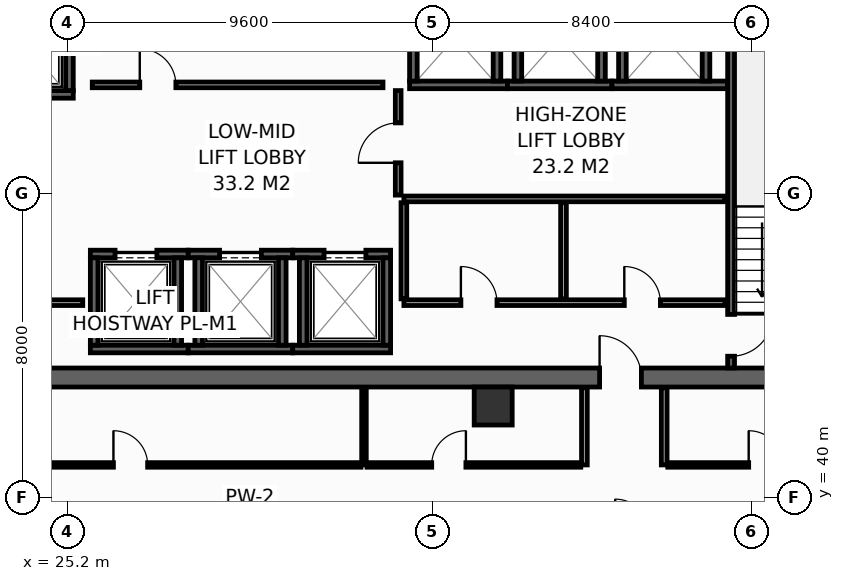
"""IFC4 building model, lengths in metres.
Left out: names, types, materials, properties, quantities, classifications, styles, units other than length and angle.
Written with IfcOpenShell. Run it as: python <this file> out.ifc"""

import sys

from ifc_helpers import new_model, si_unit, direction, frame, frame_2d, origin, origin_2d, place, context, subcontext, project, spatial, rectangle, hollow_rectangle, extrude, element, fill, save


model = new_model("IFC4")
c1 = context("Model", 3, precision=1e-05, world=origin(), true_north=direction((0.0, 1.0)))
c2 = subcontext(c1, "Body", "Model", "MODEL_VIEW")
j1 = project(units=[si_unit("LENGTHUNIT", "METRE"), si_unit("PLANEANGLEUNIT", "RADIAN")], contexts=[c1])
p1 = place(None, origin())
s1 = spatial("IfcSite", under=j1, at=p1, CompositionType="ELEMENT")
p2 = place(p1, origin())
s2 = spatial("IfcBuilding", under=s1, at=p2, CompositionType="ELEMENT")
p3 = place(p2, frame((0.0, 0.0, 160.0)))
s3 = spatial("IfcBuildingStorey", under=s2, at=p3, CompositionType="ELEMENT", Elevation=160.0)
p4 = place(p3, frame((13.6, 43.15, 0.0), z_axis=(0.0, 0.0, 1.0), x_axis=(1.0, 0.0, 0.0)))
e1 = element("IfcWall", 1, at=p4, inside=s3, PredefinedType="SHEAR", context=c2, shape_type="SweptSolid", body=[
    extrude(rectangle(XDim=32.7, YDim=0.5, at=frame_2d((16.35, 0.0))), origin(), (0.0, 0.0, 1.0), 3.55),
])
p5 = place(p4, frame((5.4, 0.0, 0.0)))
e2 = element("IfcOpeningElement", 2, at=p5, cuts=e1, PredefinedType="OPENING", context=c2, shape_type="SweptSolid", body=[
    extrude(rectangle(XDim=1.1, YDim=2.15, at=frame_2d((0.55, 1.075))), frame((0.0, 0.26, 0.0), z_axis=(0.0, -1.0, 0.0), x_axis=(1.0, 0.0, 0.0)), (0.0, 0.0, 1.0), 0.52),
])
p6 = place(p4, frame((25.6, 0.0, 0.0)))
e3 = element("IfcOpeningElement", 3, at=p6, cuts=e1, PredefinedType="OPENING", context=c2, shape_type="SweptSolid", body=[
    extrude(rectangle(XDim=1.1, YDim=2.15, at=frame_2d((0.55, 1.075))), frame((0.0, 0.26, 0.0), z_axis=(0.0, -1.0, 0.0), x_axis=(1.0, 0.0, 0.0)), (0.0, 0.0, 1.0), 0.52),
])
p7 = place(p3, frame((36.4, 42.4, 0.0), z_axis=(0.0, 0.0, 1.0), x_axis=(1.0, 0.0, 0.0)))
e4 = element("IfcColumn", 4, at=p7, inside=s3, PredefinedType="COLUMN", context=c2, shape_type="SweptSolid", body=[
    extrude(hollow_rectangle(XDim=1.0, YDim=1.0, WallThickness=0.045, at=origin_2d()), origin(), (0.0, 0.0, 1.0), 3.8),
])
p8 = place(p3, frame((22.5, 50.6, 0.0), z_axis=(0.0, 0.0, 1.0), x_axis=(1.0, 0.0, 0.0)))
e5 = element("IfcWall", 5, at=p8, inside=s3, PredefinedType="SHEAR", context=c2, shape_type="SweptSolid", body=[
    extrude(rectangle(XDim=2.85, YDim=0.2, at=frame_2d((1.425, 0.0))), origin(), (0.0, 0.0, 1.0), 3.55),
])
p9 = place(p8, frame((0.925, 0.0, 0.0)))
e6 = element("IfcOpeningElement", 6, at=p9, cuts=e5, PredefinedType="OPENING", context=c2, shape_type="SweptSolid", body=[
    extrude(rectangle(XDim=1.25, YDim=2.3, at=frame_2d((0.625, 1.15))), frame((0.0, 0.11, 0.0), z_axis=(0.0, -1.0, 0.0), x_axis=(1.0, 0.0, 0.0)), (0.0, 0.0, 1.0), 0.22),
])
p10 = place(p3, frame((25.25, 50.7, 0.0), z_axis=(0.0, 0.0, 1.0), x_axis=(0.0, 1.0, 0.0)))
e7 = element("IfcWall", 7, at=p10, inside=s3, PredefinedType="SHEAR", context=c2, shape_type="SweptSolid", body=[
    extrude(rectangle(XDim=2.6, YDim=0.2, at=frame_2d((1.3, 0.0))), origin(), (0.0, 0.0, 1.0), 3.55),
])
p11 = place(p3, frame((25.8, 43.9, 0.0), z_axis=(0.0, 0.0, 1.0), x_axis=(1.0, 0.0, 0.0)))
e8 = element("IfcWall", 8, at=p11, inside=s3, PredefinedType="SHEAR", context=c2, shape_type="SweptSolid", body=[
    extrude(rectangle(XDim=2.575, YDim=0.2, at=frame_2d((1.288, 0.0))), origin(), (0.0, 0.0, 1.0), 3.55),
])
p12 = place(p3, frame((25.8, 46.4, 0.0), z_axis=(0.0, 0.0, 1.0), x_axis=(1.0, 0.0, 0.0)))
e9 = element("IfcWall", 9, at=p12, inside=s3, PredefinedType="SHEAR", context=c2, shape_type="SweptSolid", body=[
    extrude(rectangle(XDim=2.575, YDim=0.2, at=frame_2d((1.288, 0.0))), origin(), (0.0, 0.0, 1.0), 3.55),
])
p13 = place(p12, frame((0.65, 0.0, 0.0)))
e10 = element("IfcOpeningElement", 10, at=p13, cuts=e9, PredefinedType="OPENING", context=c2, shape_type="SweptSolid", body=[
    extrude(rectangle(XDim=1.1, YDim=2.2, at=frame_2d((0.55, 1.1))), frame((0.0, 0.11, 0.0), z_axis=(0.0, -1.0, 0.0), x_axis=(1.0, 0.0, 0.0)), (0.0, 0.0, 1.0), 0.22),
])
for number, where, z_axis, x_axis in (
    (11, (25.9, 44.0, 0.0), (0.0, 0.0, 1.0), (0.0, 1.0, 0.0)),
    (12, (28.1, 44.0, 0.0), (0.0, 0.0, 1.0), (0.0, 1.0, 0.0)),
):
    element("IfcWall", number, at=place(p3, frame(where, z_axis=z_axis, x_axis=x_axis)), inside=s3, PredefinedType="SHEAR", context=c2, shape_type="SweptSolid", body=[
        extrude(rectangle(XDim=2.3, YDim=0.2, at=frame_2d((1.15, 0.0))), origin(), (0.0, 0.0, 1.0), 3.55),
    ])
p14 = place(p3, frame((28.375, 43.9, 0.0), z_axis=(0.0, 0.0, 1.0), x_axis=(1.0, 0.0, 0.0)))
e13 = element("IfcWall", 13, at=p14, inside=s3, PredefinedType="SHEAR", context=c2, shape_type="SweptSolid", body=[
    extrude(rectangle(XDim=2.75, YDim=0.2, at=frame_2d((1.375, 0.0))), origin(), (0.0, 0.0, 1.0), 3.55),
])
p15 = place(p3, frame((28.375, 46.4, 0.0), z_axis=(0.0, 0.0, 1.0), x_axis=(1.0, 0.0, 0.0)))
e14 = element("IfcWall", 14, at=p15, inside=s3, PredefinedType="SHEAR", context=c2, shape_type="SweptSolid", body=[
    extrude(rectangle(XDim=2.75, YDim=0.2, at=frame_2d((1.375, 0.0))), origin(), (0.0, 0.0, 1.0), 3.55),
])
p16 = place(p15, frame((0.825, 0.0, 0.0)))
e15 = element("IfcOpeningElement", 15, at=p16, cuts=e14, PredefinedType="OPENING", context=c2, shape_type="SweptSolid", body=[
    extrude(rectangle(XDim=1.1, YDim=2.2, at=frame_2d((0.55, 1.1))), frame((0.0, 0.11, 0.0), z_axis=(0.0, -1.0, 0.0), x_axis=(1.0, 0.0, 0.0)), (0.0, 0.0, 1.0), 0.22),
])
for number, where, z_axis, x_axis in (
    (16, (28.65, 44.0, 0.0), (0.0, 0.0, 1.0), (0.0, 1.0, 0.0)),
    (17, (30.85, 44.0, 0.0), (0.0, 0.0, 1.0), (0.0, 1.0, 0.0)),
):
    element("IfcWall", number, at=place(p3, frame(where, z_axis=z_axis, x_axis=x_axis)), inside=s3, PredefinedType="SHEAR", context=c2, shape_type="SweptSolid", body=[
        extrude(rectangle(XDim=2.3, YDim=0.2, at=frame_2d((1.15, 0.0))), origin(), (0.0, 0.0, 1.0), 3.55),
    ])
p17 = place(p3, frame((31.125, 43.9, 0.0), z_axis=(0.0, 0.0, 1.0), x_axis=(1.0, 0.0, 0.0)))
e18 = element("IfcWall", 18, at=p17, inside=s3, PredefinedType="SHEAR", context=c2, shape_type="SweptSolid", body=[
    extrude(rectangle(XDim=2.575, YDim=0.2, at=frame_2d((1.288, 0.0))), origin(), (0.0, 0.0, 1.0), 3.55),
])
p18 = place(p3, frame((31.125, 46.4, 0.0), z_axis=(0.0, 0.0, 1.0), x_axis=(1.0, 0.0, 0.0)))
e19 = element("IfcWall", 19, at=p18, inside=s3, PredefinedType="SHEAR", context=c2, shape_type="SweptSolid", body=[
    extrude(rectangle(XDim=2.575, YDim=0.2, at=frame_2d((1.288, 0.0))), origin(), (0.0, 0.0, 1.0), 3.55),
])
p19 = place(p18, frame((0.825, 0.0, 0.0)))
e20 = element("IfcOpeningElement", 20, at=p19, cuts=e19, PredefinedType="OPENING", context=c2, shape_type="SweptSolid", body=[
    extrude(rectangle(XDim=1.1, YDim=2.2, at=frame_2d((0.55, 1.1))), frame((0.0, 0.11, 0.0), z_axis=(0.0, -1.0, 0.0), x_axis=(1.0, 0.0, 0.0)), (0.0, 0.0, 1.0), 0.22),
])
for number, where, z_axis, x_axis in (
    (21, (31.4, 44.0, 0.0), (0.0, 0.0, 1.0), (0.0, 1.0, 0.0)),
    (22, (33.6, 44.0, 0.0), (0.0, 0.0, 1.0), (0.0, 1.0, 0.0)),
):
    element("IfcWall", number, at=place(p3, frame(where, z_axis=z_axis, x_axis=x_axis)), inside=s3, PredefinedType="SHEAR", context=c2, shape_type="SweptSolid", body=[
        extrude(rectangle(XDim=2.3, YDim=0.2, at=frame_2d((1.15, 0.0))), origin(), (0.0, 0.0, 1.0), 3.55),
    ])
p20 = place(p3, frame((34.2, 50.85, 0.0), z_axis=(0.0, 0.0, 1.0), x_axis=(1.0, 0.0, 0.0)))
e23 = element("IfcWall", 23, at=p20, inside=s3, PredefinedType="SHEAR", context=c2, shape_type="SweptSolid", body=[
    extrude(rectangle(XDim=2.575, YDim=0.2, at=frame_2d((1.288, 0.0))), origin(), (0.0, 0.0, 1.0), 3.55),
])
for number, where, z_axis, x_axis in (
    (24, (34.3, 50.95, 0.0), (0.0, 0.0, 1.0), (0.0, 1.0, 0.0)),
    (25, (36.5, 50.95, 0.0), (0.0, 0.0, 1.0), (0.0, 1.0, 0.0)),
):
    element("IfcWall", number, at=place(p3, frame(where, z_axis=z_axis, x_axis=x_axis)), inside=s3, PredefinedType="SHEAR", context=c2, shape_type="SweptSolid", body=[
        extrude(rectangle(XDim=2.3, YDim=0.2, at=frame_2d((1.15, 0.0))), origin(), (0.0, 0.0, 1.0), 3.55),
    ])
p21 = place(p3, frame((36.775, 50.85, 0.0), z_axis=(0.0, 0.0, 1.0), x_axis=(1.0, 0.0, 0.0)))
e26 = element("IfcWall", 26, at=p21, inside=s3, PredefinedType="SHEAR", context=c2, shape_type="SweptSolid", body=[
    extrude(rectangle(XDim=2.75, YDim=0.2, at=frame_2d((1.375, 0.0))), origin(), (0.0, 0.0, 1.0), 3.55),
])
for number, where, z_axis, x_axis in (
    (27, (37.05, 50.95, 0.0), (0.0, 0.0, 1.0), (0.0, 1.0, 0.0)),
    (28, (39.25, 50.95, 0.0), (0.0, 0.0, 1.0), (0.0, 1.0, 0.0)),
):
    element("IfcWall", number, at=place(p3, frame(where, z_axis=z_axis, x_axis=x_axis)), inside=s3, PredefinedType="SHEAR", context=c2, shape_type="SweptSolid", body=[
        extrude(rectangle(XDim=2.3, YDim=0.2, at=frame_2d((1.15, 0.0))), origin(), (0.0, 0.0, 1.0), 3.55),
    ])
p22 = place(p3, frame((39.525, 50.85, 0.0), z_axis=(0.0, 0.0, 1.0), x_axis=(1.0, 0.0, 0.0)))
e29 = element("IfcWall", 29, at=p22, inside=s3, PredefinedType="SHEAR", context=c2, shape_type="SweptSolid", body=[
    extrude(rectangle(XDim=3.045, YDim=0.2, at=frame_2d((1.522, 0.0))), origin(), (0.0, 0.0, 1.0), 3.55),
])
for number, where, z_axis, x_axis in (
    (30, (39.8, 50.95, 0.0), (0.0, 0.0, 1.0), (0.0, 1.0, 0.0)),
    (31, (42.0, 50.95, 0.0), (0.0, 0.0, 1.0), (0.0, 1.0, 0.0)),
):
    element("IfcWall", number, at=place(p3, frame(where, z_axis=z_axis, x_axis=x_axis)), inside=s3, PredefinedType="SHEAR", context=c2, shape_type="SweptSolid", body=[
        extrude(rectangle(XDim=2.3, YDim=0.2, at=frame_2d((1.15, 0.0))), origin(), (0.0, 0.0, 1.0), 3.55),
    ])
p23 = place(p3, frame((42.66, 53.8, 0.0), z_axis=(0.0, 0.0, 1.0), x_axis=(0.0, -1.0, 0.0)))
e32 = element("IfcWall", 32, at=p23, inside=s3, PredefinedType="SHEAR", context=c2, shape_type="SweptSolid", body=[
    extrude(rectangle(XDim=10.4, YDim=0.18, at=frame_2d((5.2, 0.0))), origin(), (0.0, 0.0, 1.0), 3.55),
])
p24 = place(p23, frame((8.99, 0.0, 0.0)))
e33 = element("IfcOpeningElement", 33, at=p24, cuts=e32, PredefinedType="OPENING", context=c2, shape_type="SweptSolid", body=[
    extrude(rectangle(XDim=1.1, YDim=2.15, at=frame_2d((0.55, 1.075))), frame((0.0, 0.1, 0.0), z_axis=(0.0, -1.0, 0.0), x_axis=(1.0, 0.0, 0.0)), (0.0, 0.0, 1.0), 0.2),
])
p25 = place(p3, frame((22.68, 45.12, 0.0), z_axis=(0.0, 0.0, 1.0), x_axis=(1.0, 0.0, 0.0)))
e34 = element("IfcWall", 34, at=p25, inside=s3, PredefinedType="PARTITIONING", context=c2, shape_type="SweptSolid", body=[
    extrude(rectangle(XDim=2.92, YDim=0.15, at=frame_2d((1.46, 0.0))), origin(), (0.0, 0.0, 1.0), 3.55),
])
p26 = place(p25, frame((0.85, 0.0, 0.0)))
e35 = element("IfcOpeningElement", 35, at=p26, cuts=e34, PredefinedType="OPENING", context=c2, shape_type="SweptSolid", body=[
    extrude(rectangle(XDim=1.1, YDim=2.15, at=frame_2d((0.55, 1.075))), frame((0.0, 0.085, 0.0), z_axis=(0.0, -1.0, 0.0), x_axis=(1.0, 0.0, 0.0)), (0.0, 0.0, 1.0), 0.17),
])
p27 = place(p3, frame((33.9, 47.95, 0.0), z_axis=(0.0, 0.0, 1.0), x_axis=(0.0, 1.0, 0.0)))
e36 = element("IfcWall", 36, at=p27, inside=s3, PredefinedType="PARTITIONING", context=c2, shape_type="SweptSolid", body=[
    extrude(rectangle(XDim=2.75, YDim=0.15, at=frame_2d((1.375, 0.0))), origin(), (0.0, 0.0, 1.0), 3.55),
])
p28 = place(p27, frame((0.85, 0.0, 0.0)))
e37 = element("IfcOpeningElement", 37, at=p28, cuts=e36, PredefinedType="OPENING", context=c2, shape_type="SweptSolid", body=[
    extrude(rectangle(XDim=1.05, YDim=2.15, at=frame_2d((0.525, 1.075))), frame((0.0, 0.085, 0.0), z_axis=(0.0, -1.0, 0.0), x_axis=(1.0, 0.0, 0.0)), (0.0, 0.0, 1.0), 0.17),
])
p29 = place(p3, frame((34.05, 45.12, 0.0), z_axis=(0.0, 0.0, 1.0), x_axis=(1.0, 0.0, 0.0)))
e38 = element("IfcWall", 38, at=p29, inside=s3, PredefinedType="PARTITIONING", context=c2, shape_type="SweptSolid", body=[
    extrude(rectangle(XDim=8.45, YDim=0.15, at=frame_2d((4.225, 0.0))), origin(), (0.0, 0.0, 1.0), 3.55),
])
p30 = place(p29, frame((1.5, 0.0, 0.0)))
e39 = element("IfcOpeningElement", 39, at=p30, cuts=e38, PredefinedType="OPENING", context=c2, shape_type="SweptSolid", body=[
    extrude(rectangle(XDim=0.95, YDim=2.15, at=frame_2d((0.475, 1.075))), frame((0.0, 0.085, 0.0), z_axis=(0.0, -1.0, 0.0), x_axis=(1.0, 0.0, 0.0)), (0.0, 0.0, 1.0), 0.17),
])
p31 = place(p29, frame((5.8, 0.0, 0.0)))
e40 = element("IfcOpeningElement", 40, at=p31, cuts=e38, PredefinedType="OPENING", context=c2, shape_type="SweptSolid", body=[
    extrude(rectangle(XDim=0.95, YDim=2.15, at=frame_2d((0.475, 1.075))), frame((0.0, 0.085, 0.0), z_axis=(0.0, -1.0, 0.0), x_axis=(1.0, 0.0, 0.0)), (0.0, 0.0, 1.0), 0.17),
])
p32 = place(p3, frame((34.05, 47.85, 0.0), z_axis=(0.0, 0.0, 1.0), x_axis=(1.0, 0.0, 0.0)))
e41 = element("IfcWall", 41, at=p32, inside=s3, PredefinedType="PARTITIONING", context=c2, shape_type="SweptSolid", body=[
    extrude(rectangle(XDim=8.45, YDim=0.15, at=frame_2d((4.225, 0.0))), origin(), (0.0, 0.0, 1.0), 3.55),
])
for number, where, z_axis, x_axis in (
    (42, (38.25, 45.22, 0.0), (0.0, 0.0, 1.0), (0.0, 1.0, 0.0)),
    (43, (34.05, 45.22, 0.0), (0.0, 0.0, 1.0), (0.0, 1.0, 0.0)),
):
    element("IfcWall", number, at=place(p3, frame(where, z_axis=z_axis, x_axis=x_axis)), inside=s3, PredefinedType="PARTITIONING", context=c2, shape_type="SweptSolid", body=[
        extrude(rectangle(XDim=2.53, YDim=0.15, at=frame_2d((1.265, 0.0))), origin(), (0.0, 0.0, 1.0), 3.55),
    ])
p33 = place(p3, frame((25.85, 50.85, 0.0), z_axis=(0.0, 0.0, 1.0), x_axis=(1.0, 0.0, 0.0)))
e44 = element("IfcWall", 44, at=p33, inside=s3, PredefinedType="PARTITIONING", context=c2, shape_type="SweptSolid", body=[
    extrude(rectangle(XDim=7.65, YDim=0.15, at=frame_2d((3.825, 0.0))), origin(), (0.0, 0.0, 1.0), 3.55),
])
p34 = place(p33, frame((1.25, 0.0, 0.0)))
e45 = element("IfcOpeningElement", 45, at=p34, cuts=e44, PredefinedType="OPENING", context=c2, shape_type="SweptSolid", body=[
    extrude(rectangle(XDim=0.95, YDim=2.15, at=frame_2d((0.475, 1.075))), frame((0.0, 0.085, 0.0), z_axis=(0.0, -1.0, 0.0), x_axis=(1.0, 0.0, 0.0)), (0.0, 0.0, 1.0), 0.17),
])
for number, where, z_axis, x_axis in (
    (46, (38.8, 40.85, 0.0), (0.0, 0.0, 1.0), (0.0, 1.0, 0.0)),
    (47, (40.9, 40.85, 0.0), (0.0, 0.0, 1.0), (0.0, 1.0, 0.0)),
):
    element("IfcWall", number, at=place(p3, frame(where, z_axis=z_axis, x_axis=x_axis)), inside=s3, PredefinedType="PARTITIONING", context=c2, shape_type="SweptSolid", body=[
        extrude(rectangle(XDim=2.03, YDim=0.15, at=frame_2d((1.015, 0.0))), origin(), (0.0, 0.0, 1.0), 3.55),
    ])
p35 = place(p3, frame((33.0, 40.85, 0.0), z_axis=(0.0, 0.0, 1.0), x_axis=(0.0, 1.0, 0.0)))
e48 = element("IfcWall", 48, at=p35, inside=s3, PredefinedType="PARTITIONING", context=c2, shape_type="SweptSolid", body=[
    extrude(rectangle(XDim=2.03, YDim=0.12, at=frame_2d((1.015, 0.0))), origin(), (0.0, 0.0, 1.0), 2.835),
])
p36 = place(p3, frame((20.795, 40.85, 0.0), z_axis=(0.0, 0.0, 1.0), x_axis=(1.0, 0.0, 0.0)))
e49 = element("IfcWall", 49, at=p36, inside=s3, PredefinedType="PARTITIONING", context=c2, shape_type="SweptSolid", body=[
    extrude(rectangle(XDim=12.125, YDim=0.12, at=frame_2d((6.062, 0.0))), origin(), (0.0, 0.0, 1.0), 2.835),
])
p37 = place(p36, frame((5.612, 0.0, 0.0)))
e50 = element("IfcOpeningElement", 50, at=p37, cuts=e49, PredefinedType="OPENING", context=c2, shape_type="SweptSolid", body=[
    extrude(rectangle(XDim=0.9, YDim=2.1, at=frame_2d((0.45, 1.05))), frame((0.0, 0.07, 0.0), z_axis=(0.0, -1.0, 0.0), x_axis=(1.0, 0.0, 0.0)), (0.0, 0.0, 1.0), 0.14),
])
p38 = place(p3, frame((33.08, 40.85, 0.0), z_axis=(0.0, 0.0, 1.0), x_axis=(1.0, 0.0, 0.0)))
e51 = element("IfcWall", 51, at=p38, inside=s3, PredefinedType="PARTITIONING", context=c2, shape_type="SweptSolid", body=[
    extrude(rectangle(XDim=5.625, YDim=0.12, at=frame_2d((2.812, 0.0))), origin(), (0.0, 0.0, 1.0), 2.835),
])
p39 = place(p38, frame((1.702, 0.0, 0.0)))
e52 = element("IfcOpeningElement", 52, at=p39, cuts=e51, PredefinedType="OPENING", context=c2, shape_type="SweptSolid", body=[
    extrude(rectangle(XDim=0.9, YDim=2.1, at=frame_2d((0.45, 1.05))), frame((0.0, 0.07, 0.0), z_axis=(0.0, -1.0, 0.0), x_axis=(1.0, 0.0, 0.0)), (0.0, 0.0, 1.0), 0.14),
])
p40 = place(p3, frame((40.995, 40.85, 0.0), z_axis=(0.0, 0.0, 1.0), x_axis=(1.0, 0.0, 0.0)))
e53 = element("IfcWall", 53, at=p40, inside=s3, PredefinedType="PARTITIONING", context=c2, shape_type="SweptSolid", body=[
    extrude(rectangle(XDim=5.155, YDim=0.12, at=frame_2d((2.577, 0.0))), origin(), (0.0, 0.0, 1.0), 3.55),
])
p41 = place(p40, frame((2.128, 0.0, 0.0)))
e54 = element("IfcOpeningElement", 54, at=p41, cuts=e53, PredefinedType="OPENING", context=c2, shape_type="SweptSolid", body=[
    extrude(rectangle(XDim=0.9, YDim=2.1, at=frame_2d((0.45, 1.05))), frame((0.0, 0.07, 0.0), z_axis=(0.0, -1.0, 0.0), x_axis=(1.0, 0.0, 0.0)), (0.0, 0.0, 1.0), 0.14),
])
p42 = place(p13, origin())
e55 = element("IfcDoor", 55, at=p42, inside=s3, OperationType="SLIDING_TO_LEFT", PredefinedType="DOOR", context=c2, shape_type="SweptSolid", body=[
    extrude(rectangle(XDim=1.1, YDim=2.2, at=frame_2d((0.55, 1.1))), frame((0.0, 0.025, 0.0), z_axis=(0.0, -1.0, 0.0), x_axis=(1.0, 0.0, 0.0)), (0.0, 0.0, 1.0), 0.05),
])
fill(e10, e55)
p43 = place(p16, origin())
e56 = element("IfcDoor", 56, at=p43, inside=s3, OperationType="SLIDING_TO_LEFT", PredefinedType="DOOR", context=c2, shape_type="SweptSolid", body=[
    extrude(rectangle(XDim=1.1, YDim=2.2, at=frame_2d((0.55, 1.1))), frame((0.0, 0.025, 0.0), z_axis=(0.0, -1.0, 0.0), x_axis=(1.0, 0.0, 0.0)), (0.0, 0.0, 1.0), 0.05),
])
fill(e15, e56)
p44 = place(p19, origin())
e57 = element("IfcDoor", 57, at=p44, inside=s3, OperationType="SLIDING_TO_LEFT", PredefinedType="DOOR", context=c2, shape_type="SweptSolid", body=[
    extrude(rectangle(XDim=1.1, YDim=2.2, at=frame_2d((0.55, 1.1))), frame((0.0, 0.025, 0.0), z_axis=(0.0, -1.0, 0.0), x_axis=(1.0, 0.0, 0.0)), (0.0, 0.0, 1.0), 0.05),
])
fill(e20, e57)
p45 = place(p24, origin())
e58 = element("IfcDoor", 58, at=p45, inside=s3, OperationType="SINGLE_SWING_LEFT", PredefinedType="DOOR", context=c2, shape_type="SweptSolid", body=[
    extrude(rectangle(XDim=1.1, YDim=2.15, at=frame_2d((0.55, 1.075))), frame((0.0, 0.025, 0.0), z_axis=(0.0, -1.0, 0.0), x_axis=(1.0, 0.0, 0.0)), (0.0, 0.0, 1.0), 0.05),
])
fill(e33, e58)
p46 = place(p6, origin())
e59 = element("IfcDoor", 59, at=p46, inside=s3, OperationType="SINGLE_SWING_LEFT", PredefinedType="DOOR", context=c2, shape_type="SweptSolid", body=[
    extrude(rectangle(XDim=1.1, YDim=2.15, at=frame_2d((0.55, 1.075))), frame((0.0, 0.025, 0.0), z_axis=(0.0, -1.0, 0.0), x_axis=(1.0, 0.0, 0.0)), (0.0, 0.0, 1.0), 0.05),
])
fill(e3, e59)
p47 = place(p28, origin())
e60 = element("IfcDoor", 60, at=p47, inside=s3, OperationType="SINGLE_SWING_LEFT", PredefinedType="DOOR", context=c2, shape_type="SweptSolid", body=[
    extrude(rectangle(XDim=1.05, YDim=2.15, at=frame_2d((0.525, 1.075))), frame((0.0, 0.025, 0.0), z_axis=(0.0, -1.0, 0.0), x_axis=(1.0, 0.0, 0.0)), (0.0, 0.0, 1.0), 0.05),
])
fill(e37, e60)
p48 = place(p30, origin())
e61 = element("IfcDoor", 61, at=p48, inside=s3, OperationType="SINGLE_SWING_LEFT", PredefinedType="DOOR", context=c2, shape_type="SweptSolid", body=[
    extrude(rectangle(XDim=0.95, YDim=2.15, at=frame_2d((0.475, 1.075))), frame((0.0, 0.025, 0.0), z_axis=(0.0, -1.0, 0.0), x_axis=(1.0, 0.0, 0.0)), (0.0, 0.0, 1.0), 0.05),
])
fill(e39, e61)
p49 = place(p31, origin())
e62 = element("IfcDoor", 62, at=p49, inside=s3, OperationType="SINGLE_SWING_LEFT", PredefinedType="DOOR", context=c2, shape_type="SweptSolid", body=[
    extrude(rectangle(XDim=0.95, YDim=2.15, at=frame_2d((0.475, 1.075))), frame((0.0, 0.025, 0.0), z_axis=(0.0, -1.0, 0.0), x_axis=(1.0, 0.0, 0.0)), (0.0, 0.0, 1.0), 0.05),
])
fill(e40, e62)
p50 = place(p34, origin())
e63 = element("IfcDoor", 63, at=p50, inside=s3, OperationType="SINGLE_SWING_LEFT", PredefinedType="DOOR", context=c2, shape_type="SweptSolid", body=[
    extrude(rectangle(XDim=0.95, YDim=2.15, at=frame_2d((0.475, 1.075))), frame((0.0, 0.025, 0.0), z_axis=(0.0, -1.0, 0.0), x_axis=(1.0, 0.0, 0.0)), (0.0, 0.0, 1.0), 0.05),
])
fill(e45, e63)
p51 = place(p37, origin())
e64 = element("IfcDoor", 64, at=p51, inside=s3, OperationType="SINGLE_SWING_LEFT", PredefinedType="DOOR", context=c2, shape_type="SweptSolid", body=[
    extrude(rectangle(XDim=0.9, YDim=2.1, at=frame_2d((0.45, 1.05))), frame((0.0, 0.025, 0.0), z_axis=(0.0, -1.0, 0.0), x_axis=(1.0, 0.0, 0.0)), (0.0, 0.0, 1.0), 0.05),
])
fill(e50, e64)
p52 = place(p39, origin())
e65 = element("IfcDoor", 65, at=p52, inside=s3, OperationType="SINGLE_SWING_RIGHT", PredefinedType="DOOR", context=c2, shape_type="SweptSolid", body=[
    extrude(rectangle(XDim=0.9, YDim=2.1, at=frame_2d((0.45, 1.05))), frame((0.0, 0.025, 0.0), z_axis=(0.0, -1.0, 0.0), x_axis=(1.0, 0.0, 0.0)), (0.0, 0.0, 1.0), 0.05),
])
fill(e52, e65)
p53 = place(p41, origin())
e66 = element("IfcDoor", 66, at=p53, inside=s3, OperationType="SINGLE_SWING_LEFT", PredefinedType="DOOR", context=c2, shape_type="SweptSolid", body=[
    extrude(rectangle(XDim=0.9, YDim=2.1, at=frame_2d((0.45, 1.05))), frame((0.0, 0.025, 0.0), z_axis=(0.0, -1.0, 0.0), x_axis=(1.0, 0.0, 0.0)), (0.0, 0.0, 1.0), 0.05),
])
fill(e54, e66)
save(model, sys.argv[1])
